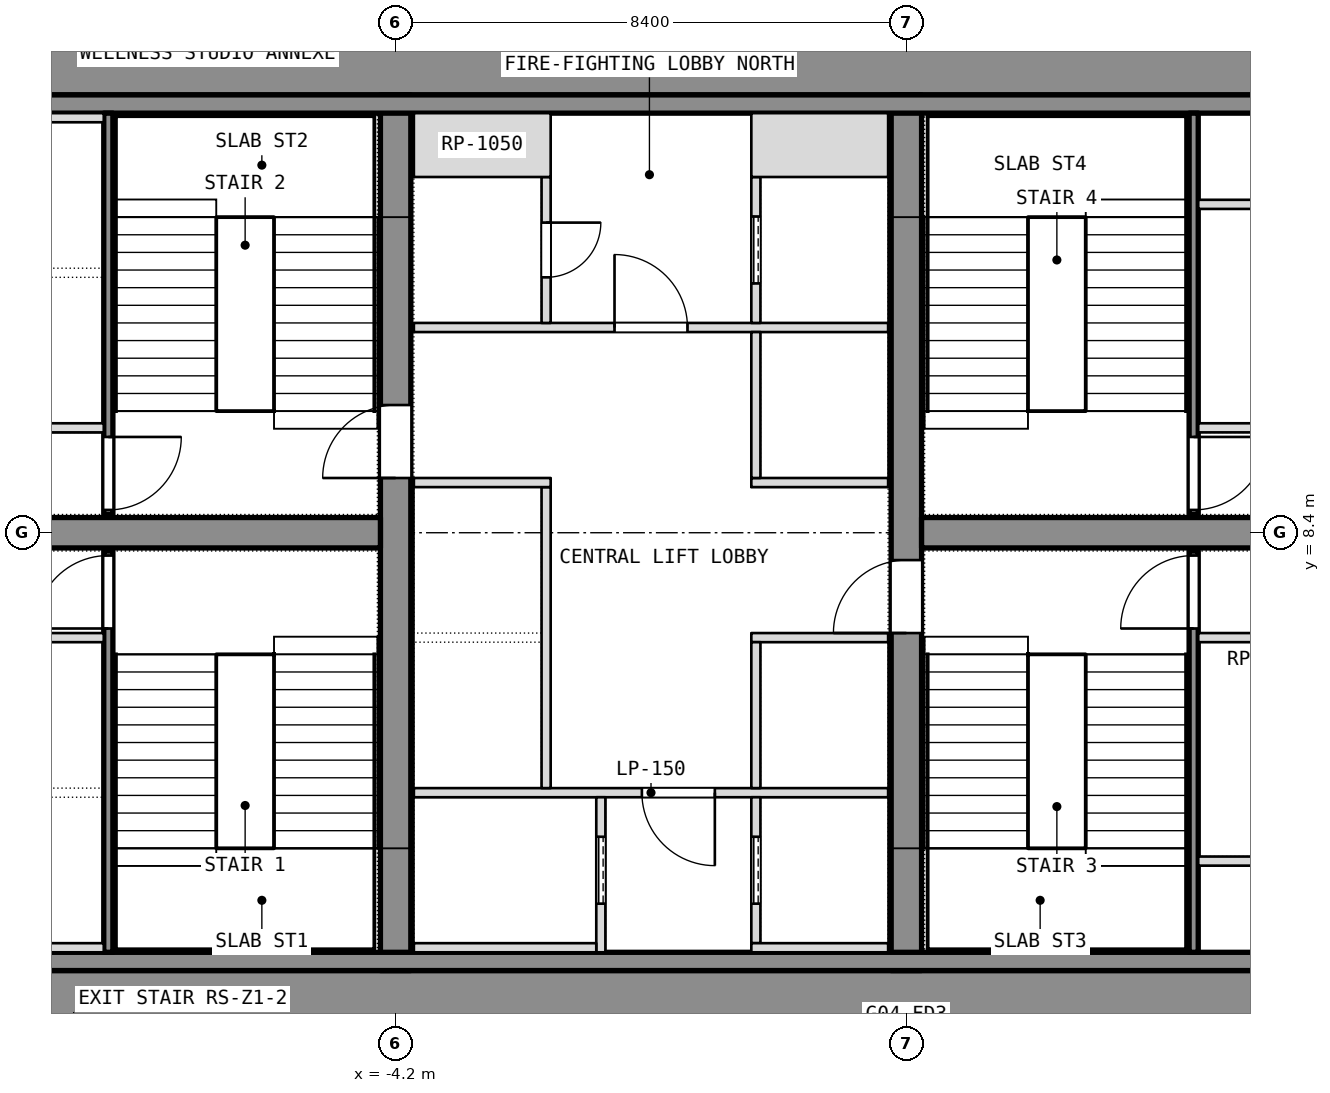
"""IFC4 building model, lengths in metres.
Left out: names, types, materials, properties, quantities, classifications, styles, units other than length and angle.
Written with IfcOpenShell. Run it as: python <this file> out.ifc"""

import sys

from ifc_helpers import new_model, si_unit, direction, frame, frame_2d, origin, place, context, subcontext, project, spatial, rectangle, extrude, element, fill, save


model = new_model("IFC4")
c1 = context("Model", 3, precision=1e-05, world=origin(), true_north=direction((0.0, 1.0)))
c2 = subcontext(c1, "Body", "Model", "MODEL_VIEW")
j1 = project(units=[si_unit("LENGTHUNIT", "METRE"), si_unit("PLANEANGLEUNIT", "RADIAN")], contexts=[c1])
p1 = place(None, origin())
s1 = spatial("IfcSite", under=j1, at=p1, CompositionType="ELEMENT")
p2 = place(p1, origin())
s2 = spatial("IfcBuilding", under=s1, at=p2, CompositionType="ELEMENT")
p3 = place(p2, frame((0.0, 0.0, 58.1)))
s3 = spatial("IfcBuildingStorey", under=s2, at=p3, CompositionType="ELEMENT", Elevation=58.1)
for number, where, z_axis, x_axis in (
    (1, (-11.1, 0.6, 0.0), (0.0, 0.0, 1.0), (1.0, 0.0, 0.0)),
    (2, (-11.1, 16.2, 0.0), (0.0, 0.0, 1.0), (1.0, 0.0, 0.0)),
):
    element("IfcWall", number, at=place(p3, frame(where, z_axis=z_axis, x_axis=x_axis)), inside=s3, PredefinedType="SHEAR", context=c2, shape_type="SweptSolid", body=[
        extrude(rectangle(XDim=22.2, YDim=1.2, at=frame_2d((11.1, 0.0))), origin(), (0.0, 0.0, 1.0), 3.6),
    ])
p4 = place(p3, frame((-4.2, 1.2, 0.0), z_axis=(0.0, 0.0, 1.0), x_axis=(0.0, 1.0, 0.0)))
e3 = element("IfcWall", 3, at=p4, inside=s3, PredefinedType="SHEAR", context=c2, shape_type="SweptSolid", body=[
    extrude(rectangle(XDim=14.4, YDim=0.5, at=frame_2d((7.2, 0.0))), origin(), (0.0, 0.0, 1.0), 3.6),
])
p5 = place(p4, frame((8.1, 0.0, 0.0)))
e4 = element("IfcOpeningElement", 4, at=p5, cuts=e3, PredefinedType="OPENING", context=c2, shape_type="SweptSolid", body=[
    extrude(rectangle(XDim=1.2, YDim=2.1, at=frame_2d((0.6, 1.05))), frame((0.0, 0.25, 0.0), z_axis=(0.0, -1.0, 0.0), x_axis=(1.0, 0.0, 0.0)), (0.0, 0.0, 1.0), 0.5),
])
p6 = place(p3, frame((4.2, 1.2, 0.0), z_axis=(0.0, 0.0, 1.0), x_axis=(0.0, 1.0, 0.0)))
e5 = element("IfcWall", 5, at=p6, inside=s3, PredefinedType="SHEAR", context=c2, shape_type="SweptSolid", body=[
    extrude(rectangle(XDim=14.4, YDim=0.5, at=frame_2d((7.2, 0.0))), origin(), (0.0, 0.0, 1.0), 3.6),
])
p7 = place(p6, frame((5.55, 0.0, 0.0)))
e6 = element("IfcOpeningElement", 6, at=p7, cuts=e5, PredefinedType="OPENING", context=c2, shape_type="SweptSolid", body=[
    extrude(rectangle(XDim=1.2, YDim=2.1, at=frame_2d((0.6, 1.05))), frame((0.0, 0.25, 0.0), z_axis=(0.0, -1.0, 0.0), x_axis=(1.0, 0.0, 0.0)), (0.0, 0.0, 1.0), 0.5),
])
for number, where, z_axis, x_axis in (
    (7, (-11.1, 8.4, 0.0), (0.0, 0.0, 1.0), (1.0, 0.0, 0.0)),
    (8, (4.45, 8.4, 0.0), (0.0, 0.0, 1.0), (1.0, 0.0, 0.0)),
):
    element("IfcWall", number, at=place(p3, frame(where, z_axis=z_axis, x_axis=x_axis)), inside=s3, PredefinedType="SHEAR", context=c2, shape_type="SweptSolid", body=[
        extrude(rectangle(XDim=6.65, YDim=0.5, at=frame_2d((3.325, 0.0))), origin(), (0.0, 0.0, 1.0), 3.6),
    ])
for number, where, z_axis, x_axis in (
    (9, (-11.1, 1.35, 0.0), (0.0, 0.0, 1.0), (1.0, 0.0, 0.0)),
    (10, (-11.1, 15.45, 0.0), (0.0, 0.0, 1.0), (1.0, 0.0, 0.0)),
):
    element("IfcWall", number, at=place(p3, frame(where, z_axis=z_axis, x_axis=x_axis)), inside=s3, PredefinedType="PARTITIONING", context=c2, shape_type="SweptSolid", body=[
        extrude(rectangle(XDim=22.2, YDim=0.3, at=frame_2d((11.1, 0.0))), origin(), (0.0, 0.0, 1.0), 3.34),
    ])
p8 = place(p3, frame((-8.925, 1.5, 0.0), z_axis=(0.0, 0.0, 1.0), x_axis=(0.0, 1.0, 0.0)))
e11 = element("IfcWall", 11, at=p8, inside=s3, PredefinedType="SHEAR", context=c2, shape_type="SweptSolid", body=[
    extrude(rectangle(XDim=6.6, YDim=0.15, at=frame_2d((3.3, 0.0))), origin(), (0.0, 0.0, 1.0), 3.34),
])
p9 = place(p8, frame((5.325, 0.0, 0.0)))
e12 = element("IfcOpeningElement", 12, at=p9, cuts=e11, PredefinedType="OPENING", context=c2, shape_type="SweptSolid", body=[
    extrude(rectangle(XDim=1.2, YDim=2.1, at=frame_2d((0.6, 1.05))), frame((0.0, 0.075, 0.0), z_axis=(0.0, -1.0, 0.0), x_axis=(1.0, 0.0, 0.0)), (0.0, 0.0, 1.0), 0.15),
])
for number, where, z_axis, x_axis in (
    (13, (-11.1, 6.675, 0.0), (0.0, 0.0, 1.0), (1.0, 0.0, 0.0)),
    (14, (-11.1, 1.575, 0.0), (0.0, 0.0, 1.0), (1.0, 0.0, 0.0)),
):
    element("IfcWall", number, at=place(p3, frame(where, z_axis=z_axis, x_axis=x_axis)), inside=s3, PredefinedType="SHEAR", context=c2, shape_type="SweptSolid", body=[
        extrude(rectangle(XDim=2.1, YDim=0.15, at=frame_2d((1.05, 0.0))), origin(), (0.0, 0.0, 1.0), 3.6),
    ])
p10 = place(p3, frame((-8.925, 8.7, 0.0), z_axis=(0.0, 0.0, 1.0), x_axis=(0.0, 1.0, 0.0)))
e15 = element("IfcWall", 15, at=p10, inside=s3, PredefinedType="SHEAR", context=c2, shape_type="SweptSolid", body=[
    extrude(rectangle(XDim=6.6, YDim=0.15, at=frame_2d((3.3, 0.0))), origin(), (0.0, 0.0, 1.0), 3.34),
])
p11 = place(p10, frame((0.075, 0.0, 0.0)))
e16 = element("IfcOpeningElement", 16, at=p11, cuts=e15, PredefinedType="OPENING", context=c2, shape_type="SweptSolid", body=[
    extrude(rectangle(XDim=1.2, YDim=2.1, at=frame_2d((0.6, 1.05))), frame((0.0, 0.075, 0.0), z_axis=(0.0, -1.0, 0.0), x_axis=(1.0, 0.0, 0.0)), (0.0, 0.0, 1.0), 0.15),
])
for number, where, z_axis, x_axis in (
    (17, (-11.1, 10.125, 0.0), (0.0, 0.0, 1.0), (1.0, 0.0, 0.0)),
    (18, (-11.1, 15.225, 0.0), (0.0, 0.0, 1.0), (1.0, 0.0, 0.0)),
):
    element("IfcWall", number, at=place(p3, frame(where, z_axis=z_axis, x_axis=x_axis)), inside=s3, PredefinedType="SHEAR", context=c2, shape_type="SweptSolid", body=[
        extrude(rectangle(XDim=2.1, YDim=0.15, at=frame_2d((1.05, 0.0))), origin(), (0.0, 0.0, 1.0), 3.6),
    ])
p12 = place(p3, frame((8.925, 1.5, 0.0), z_axis=(0.0, 0.0, 1.0), x_axis=(0.0, 1.0, 0.0)))
e19 = element("IfcWall", 19, at=p12, inside=s3, PredefinedType="SHEAR", context=c2, shape_type="SweptSolid", body=[
    extrude(rectangle(XDim=6.6, YDim=0.15, at=frame_2d((3.3, 0.0))), origin(), (0.0, 0.0, 1.0), 3.34),
])
p13 = place(p12, frame((5.325, 0.0, 0.0)))
e20 = element("IfcOpeningElement", 20, at=p13, cuts=e19, PredefinedType="OPENING", context=c2, shape_type="SweptSolid", body=[
    extrude(rectangle(XDim=1.2, YDim=2.1, at=frame_2d((0.6, 1.05))), frame((0.0, 0.075, 0.0), z_axis=(0.0, -1.0, 0.0), x_axis=(1.0, 0.0, 0.0)), (0.0, 0.0, 1.0), 0.15),
])
for number, where, z_axis, x_axis in (
    (21, (9.0, 6.675, 0.0), (0.0, 0.0, 1.0), (1.0, 0.0, 0.0)),
    (22, (9.0, 3.0, 0.0), (0.0, 0.0, 1.0), (1.0, 0.0, 0.0)),
):
    element("IfcWall", number, at=place(p3, frame(where, z_axis=z_axis, x_axis=x_axis)), inside=s3, PredefinedType="PARTITIONING", context=c2, shape_type="SweptSolid", body=[
        extrude(rectangle(XDim=2.1, YDim=0.15, at=frame_2d((1.05, 0.0))), origin(), (0.0, 0.0, 1.0), 3.34),
    ])
p14 = place(p3, frame((8.925, 8.7, 0.0), z_axis=(0.0, 0.0, 1.0), x_axis=(0.0, 1.0, 0.0)))
e23 = element("IfcWall", 23, at=p14, inside=s3, PredefinedType="SHEAR", context=c2, shape_type="SweptSolid", body=[
    extrude(rectangle(XDim=6.6, YDim=0.15, at=frame_2d((3.3, 0.0))), origin(), (0.0, 0.0, 1.0), 3.34),
])
p15 = place(p14, frame((0.075, 0.0, 0.0)))
e24 = element("IfcOpeningElement", 24, at=p15, cuts=e23, PredefinedType="OPENING", context=c2, shape_type="SweptSolid", body=[
    extrude(rectangle(XDim=1.2, YDim=2.1, at=frame_2d((0.6, 1.05))), frame((0.0, 0.075, 0.0), z_axis=(0.0, -1.0, 0.0), x_axis=(1.0, 0.0, 0.0)), (0.0, 0.0, 1.0), 0.15),
])
for number, where, z_axis, x_axis in (
    (25, (9.0, 10.125, 0.0), (0.0, 0.0, 1.0), (1.0, 0.0, 0.0)),
    (26, (9.0, 13.8, 0.0), (0.0, 0.0, 1.0), (1.0, 0.0, 0.0)),
):
    element("IfcWall", number, at=place(p3, frame(where, z_axis=z_axis, x_axis=x_axis)), inside=s3, PredefinedType="PARTITIONING", context=c2, shape_type="SweptSolid", body=[
        extrude(rectangle(XDim=2.1, YDim=0.15, at=frame_2d((1.05, 0.0))), origin(), (0.0, 0.0, 1.0), 3.34),
    ])
p16 = place(p3, frame((-3.9, 4.125, 0.0), z_axis=(0.0, 0.0, 1.0), x_axis=(1.0, 0.0, 0.0)))
e27 = element("IfcWall", 27, at=p16, inside=s3, PredefinedType="PARTITIONING", context=c2, shape_type="SweptSolid", body=[
    extrude(rectangle(XDim=7.8, YDim=0.15, at=frame_2d((3.9, 0.0))), origin(), (0.0, 0.0, 1.0), 3.34),
])
p17 = place(p16, frame((3.75, 0.0, 0.0)))
e28 = element("IfcOpeningElement", 28, at=p17, cuts=e27, PredefinedType="OPENING", context=c2, shape_type="SweptSolid", body=[
    extrude(rectangle(XDim=1.2, YDim=2.1, at=frame_2d((0.6, 1.05))), frame((0.0, 0.075, 0.0), z_axis=(0.0, -1.0, 0.0), x_axis=(1.0, 0.0, 0.0)), (0.0, 0.0, 1.0), 0.15),
])
p18 = place(p3, frame((-3.9, 11.775, 0.0), z_axis=(0.0, 0.0, 1.0), x_axis=(1.0, 0.0, 0.0)))
e29 = element("IfcWall", 29, at=p18, inside=s3, PredefinedType="PARTITIONING", context=c2, shape_type="SweptSolid", body=[
    extrude(rectangle(XDim=7.8, YDim=0.15, at=frame_2d((3.9, 0.0))), origin(), (0.0, 0.0, 1.0), 3.34),
])
p19 = place(p18, frame((3.3, 0.0, 0.0)))
e30 = element("IfcOpeningElement", 30, at=p19, cuts=e29, PredefinedType="OPENING", context=c2, shape_type="SweptSolid", body=[
    extrude(rectangle(XDim=1.2, YDim=2.1, at=frame_2d((0.6, 1.05))), frame((0.0, 0.075, 0.0), z_axis=(0.0, -1.0, 0.0), x_axis=(1.0, 0.0, 0.0)), (0.0, 0.0, 1.0), 0.15),
])
p20 = place(p3, frame((-0.825, 1.5, 0.0), z_axis=(0.0, 0.0, 1.0), x_axis=(0.0, 1.0, 0.0)))
e31 = element("IfcWall", 31, at=p20, inside=s3, PredefinedType="SHEAR", context=c2, shape_type="SweptSolid", body=[
    extrude(rectangle(XDim=2.55, YDim=0.15, at=frame_2d((1.275, 0.0))), origin(), (0.0, 0.0, 1.0), 3.6),
])
p21 = place(p20, frame((0.8, 0.0, 0.0)))
e32 = element("IfcOpeningElement", 32, at=p21, cuts=e31, PredefinedType="OPENING", context=c2, shape_type="SweptSolid", body=[
    extrude(rectangle(XDim=1.1, YDim=2.1, at=frame_2d((0.55, 1.05))), frame((0.0, 0.075, 0.0), z_axis=(0.0, -1.0, 0.0), x_axis=(1.0, 0.0, 0.0)), (0.0, 0.0, 1.0), 0.15),
])
p22 = place(p3, frame((-3.9, 1.575, 0.0), z_axis=(0.0, 0.0, 1.0), x_axis=(1.0, 0.0, 0.0)))
e33 = element("IfcWall", 33, at=p22, inside=s3, PredefinedType="SHEAR", context=c2, shape_type="SweptSolid", body=[
    extrude(rectangle(XDim=3.0, YDim=0.15, at=frame_2d((1.5, 0.0))), origin(), (0.0, 0.0, 1.0), 3.6),
])
p23 = place(p3, frame((-1.725, 4.2, 0.0), z_axis=(0.0, 0.0, 1.0), x_axis=(0.0, 1.0, 0.0)))
e34 = element("IfcWall", 34, at=p23, inside=s3, PredefinedType="SHEAR", context=c2, shape_type="SweptSolid", body=[
    extrude(rectangle(XDim=4.95, YDim=0.15, at=frame_2d((2.475, 0.0))), origin(), (0.0, 0.0, 1.0), 3.6),
])
p24 = place(p3, frame((-3.9, 9.225, 0.0), z_axis=(0.0, 0.0, 1.0), x_axis=(1.0, 0.0, 0.0)))
e35 = element("IfcWall", 35, at=p24, inside=s3, PredefinedType="SHEAR", context=c2, shape_type="SweptSolid", body=[
    extrude(rectangle(XDim=2.25, YDim=0.15, at=frame_2d((1.125, 0.0))), origin(), (0.0, 0.0, 1.0), 3.6),
])
p25 = place(p3, frame((-1.725, 11.85, 0.0), z_axis=(0.0, 0.0, 1.0), x_axis=(0.0, 1.0, 0.0)))
e36 = element("IfcWall", 36, at=p25, inside=s3, PredefinedType="PARTITIONING", context=c2, shape_type="SweptSolid", body=[
    extrude(rectangle(XDim=2.4, YDim=0.15, at=frame_2d((1.2, 0.0))), origin(), (0.0, 0.0, 1.0), 3.34),
])
p26 = place(p25, frame((0.75, 0.0, 0.0)))
e37 = element("IfcOpeningElement", 37, at=p26, cuts=e36, PredefinedType="OPENING", context=c2, shape_type="SweptSolid", body=[
    extrude(rectangle(XDim=0.9, YDim=2.1, at=frame_2d((0.45, 1.05))), frame((0.0, 0.075, 0.0), z_axis=(0.0, -1.0, 0.0), x_axis=(1.0, 0.0, 0.0)), (0.0, 0.0, 1.0), 0.15),
])
p27 = place(p3, frame((-3.9, 14.775, 0.0), z_axis=(0.0, 0.0, 1.0), x_axis=(1.0, 0.0, 0.0)))
e38 = element("IfcWall", 38, at=p27, inside=s3, PredefinedType="PARTITIONING", context=c2, shape_type="SweptSolid", body=[
    extrude(rectangle(XDim=2.25, YDim=1.05, at=frame_2d((1.125, 0.0))), origin(), (0.0, 0.0, 1.0), 3.34),
])
p28 = place(p3, frame((1.725, 1.65, 0.0), z_axis=(0.0, 0.0, 1.0), x_axis=(0.0, 1.0, 0.0)))
e39 = element("IfcWall", 39, at=p28, inside=s3, PredefinedType="SHEAR", context=c2, shape_type="SweptSolid", body=[
    extrude(rectangle(XDim=2.4, YDim=0.15, at=frame_2d((1.2, 0.0))), origin(), (0.0, 0.0, 1.0), 3.6),
])
p29 = place(p28, frame((0.65, 0.0, 0.0)))
e40 = element("IfcOpeningElement", 40, at=p29, cuts=e39, PredefinedType="OPENING", context=c2, shape_type="SweptSolid", body=[
    extrude(rectangle(XDim=1.1, YDim=2.1, at=frame_2d((0.55, 1.05))), frame((0.0, 0.075, 0.0), z_axis=(0.0, -1.0, 0.0), x_axis=(1.0, 0.0, 0.0)), (0.0, 0.0, 1.0), 0.15),
])
p30 = place(p3, frame((1.65, 1.575, 0.0), z_axis=(0.0, 0.0, 1.0), x_axis=(1.0, 0.0, 0.0)))
e41 = element("IfcWall", 41, at=p30, inside=s3, PredefinedType="SHEAR", context=c2, shape_type="SweptSolid", body=[
    extrude(rectangle(XDim=2.25, YDim=0.15, at=frame_2d((1.125, 0.0))), origin(), (0.0, 0.0, 1.0), 3.6),
])
p31 = place(p3, frame((1.725, 11.85, 0.0), z_axis=(0.0, 0.0, 1.0), x_axis=(0.0, 1.0, 0.0)))
e42 = element("IfcWall", 42, at=p31, inside=s3, PredefinedType="SHEAR", context=c2, shape_type="SweptSolid", body=[
    extrude(rectangle(XDim=2.4, YDim=0.15, at=frame_2d((1.2, 0.0))), origin(), (0.0, 0.0, 1.0), 3.6),
])
p32 = place(p31, frame((0.65, 0.0, 0.0)))
e43 = element("IfcOpeningElement", 43, at=p32, cuts=e42, PredefinedType="OPENING", context=c2, shape_type="SweptSolid", body=[
    extrude(rectangle(XDim=1.1, YDim=2.1, at=frame_2d((0.55, 1.05))), frame((0.0, 0.075, 0.0), z_axis=(0.0, -1.0, 0.0), x_axis=(1.0, 0.0, 0.0)), (0.0, 0.0, 1.0), 0.15),
])
p33 = place(p3, frame((1.65, 14.775, 0.0), z_axis=(0.0, 0.0, 1.0), x_axis=(1.0, 0.0, 0.0)))
e44 = element("IfcWall", 44, at=p33, inside=s3, PredefinedType="SHEAR", context=c2, shape_type="SweptSolid", body=[
    extrude(rectangle(XDim=2.25, YDim=1.05, at=frame_2d((1.125, 0.0))), origin(), (0.0, 0.0, 1.0), 3.6),
])
for number, where, z_axis, x_axis in (
    (45, (1.65, 6.675, 0.0), (0.0, 0.0, 1.0), (1.0, 0.0, 0.0)),
    (46, (1.65, 9.225, 0.0), (0.0, 0.0, 1.0), (1.0, 0.0, 0.0)),
):
    element("IfcWall", number, at=place(p3, frame(where, z_axis=z_axis, x_axis=x_axis)), inside=s3, PredefinedType="SHEAR", context=c2, shape_type="SweptSolid", body=[
        extrude(rectangle(XDim=2.25, YDim=0.15, at=frame_2d((1.125, 0.0))), origin(), (0.0, 0.0, 1.0), 3.6),
    ])
p34 = place(p3, frame((1.725, 4.2, 0.0), z_axis=(0.0, 0.0, 1.0), x_axis=(0.0, 1.0, 0.0)))
e47 = element("IfcWall", 47, at=p34, inside=s3, PredefinedType="SHEAR", context=c2, shape_type="SweptSolid", body=[
    extrude(rectangle(XDim=2.4, YDim=0.15, at=frame_2d((1.2, 0.0))), origin(), (0.0, 0.0, 1.0), 3.6),
])
p35 = place(p3, frame((1.725, 9.3, 0.0), z_axis=(0.0, 0.0, 1.0), x_axis=(0.0, 1.0, 0.0)))
e48 = element("IfcWall", 48, at=p35, inside=s3, PredefinedType="SHEAR", context=c2, shape_type="SweptSolid", body=[
    extrude(rectangle(XDim=2.4, YDim=0.15, at=frame_2d((1.2, 0.0))), origin(), (0.0, 0.0, 1.0), 3.6),
])
p36 = place(p9, origin())
e49 = element("IfcDoor", 49, at=p36, inside=s3, OperationType="SINGLE_SWING_LEFT", PredefinedType="DOOR", context=c2, shape_type="SweptSolid", body=[
    extrude(rectangle(XDim=1.2, YDim=2.1, at=frame_2d((0.6, 1.05))), frame((0.0, 0.025, 0.0), z_axis=(0.0, -1.0, 0.0), x_axis=(1.0, 0.0, 0.0)), (0.0, 0.0, 1.0), 0.05),
])
fill(e12, e49)
p37 = place(p11, origin())
e50 = element("IfcDoor", 50, at=p37, inside=s3, OperationType="SINGLE_SWING_LEFT", PredefinedType="DOOR", context=c2, shape_type="SweptSolid", body=[
    extrude(rectangle(XDim=1.2, YDim=2.1, at=frame_2d((0.6, 1.05))), frame((0.0, 0.025, 0.0), z_axis=(0.0, -1.0, 0.0), x_axis=(1.0, 0.0, 0.0)), (0.0, 0.0, 1.0), 0.05),
])
fill(e16, e50)
p38 = place(p13, origin())
e51 = element("IfcDoor", 51, at=p38, inside=s3, OperationType="SINGLE_SWING_LEFT", PredefinedType="DOOR", context=c2, shape_type="SweptSolid", body=[
    extrude(rectangle(XDim=1.2, YDim=2.1, at=frame_2d((0.6, 1.05))), frame((0.0, 0.025, 0.0), z_axis=(0.0, -1.0, 0.0), x_axis=(1.0, 0.0, 0.0)), (0.0, 0.0, 1.0), 0.05),
])
fill(e20, e51)
p39 = place(p15, origin())
e52 = element("IfcDoor", 52, at=p39, inside=s3, OperationType="SINGLE_SWING_LEFT", PredefinedType="DOOR", context=c2, shape_type="SweptSolid", body=[
    extrude(rectangle(XDim=1.2, YDim=2.1, at=frame_2d((0.6, 1.05))), frame((0.0, 0.025, 0.0), z_axis=(0.0, -1.0, 0.0), x_axis=(1.0, 0.0, 0.0)), (0.0, 0.0, 1.0), 0.05),
])
fill(e24, e52)
p40 = place(p21, origin())
e53 = element("IfcDoor", 53, at=p40, inside=s3, OperationType="SLIDING_TO_LEFT", PredefinedType="DOOR", context=c2, shape_type="SweptSolid", body=[
    extrude(rectangle(XDim=1.1, YDim=2.1, at=frame_2d((0.55, 1.05))), frame((0.0, 0.025, 0.0), z_axis=(0.0, -1.0, 0.0), x_axis=(1.0, 0.0, 0.0)), (0.0, 0.0, 1.0), 0.05),
])
fill(e32, e53)
p41 = place(p29, origin())
e54 = element("IfcDoor", 54, at=p41, inside=s3, OperationType="SLIDING_TO_LEFT", PredefinedType="DOOR", context=c2, shape_type="SweptSolid", body=[
    extrude(rectangle(XDim=1.1, YDim=2.1, at=frame_2d((0.55, 1.05))), frame((0.0, 0.025, 0.0), z_axis=(0.0, -1.0, 0.0), x_axis=(1.0, 0.0, 0.0)), (0.0, 0.0, 1.0), 0.05),
])
fill(e40, e54)
p42 = place(p32, origin())
e55 = element("IfcDoor", 55, at=p42, inside=s3, OperationType="SLIDING_TO_LEFT", PredefinedType="DOOR", context=c2, shape_type="SweptSolid", body=[
    extrude(rectangle(XDim=1.1, YDim=2.1, at=frame_2d((0.55, 1.05))), frame((0.0, 0.025, 0.0), z_axis=(0.0, -1.0, 0.0), x_axis=(1.0, 0.0, 0.0)), (0.0, 0.0, 1.0), 0.05),
])
fill(e43, e55)
p43 = place(p17, origin())
e56 = element("IfcDoor", 56, at=p43, inside=s3, OperationType="SINGLE_SWING_LEFT", PredefinedType="DOOR", context=c2, shape_type="SweptSolid", body=[
    extrude(rectangle(XDim=1.2, YDim=2.1, at=frame_2d((0.6, 1.05))), frame((0.0, 0.025, 0.0), z_axis=(0.0, -1.0, 0.0), x_axis=(1.0, 0.0, 0.0)), (0.0, 0.0, 1.0), 0.05),
])
fill(e28, e56)
p44 = place(p19, origin())
e57 = element("IfcDoor", 57, at=p44, inside=s3, OperationType="SINGLE_SWING_LEFT", PredefinedType="DOOR", context=c2, shape_type="SweptSolid", body=[
    extrude(rectangle(XDim=1.2, YDim=2.1, at=frame_2d((0.6, 1.05))), frame((0.0, 0.025, 0.0), z_axis=(0.0, -1.0, 0.0), x_axis=(1.0, 0.0, 0.0)), (0.0, 0.0, 1.0), 0.05),
])
fill(e30, e57)
p45 = place(p26, origin())
e58 = element("IfcDoor", 58, at=p45, inside=s3, OperationType="SINGLE_SWING_LEFT", PredefinedType="DOOR", context=c2, shape_type="SweptSolid", body=[
    extrude(rectangle(XDim=0.9, YDim=2.1, at=frame_2d((0.45, 1.05))), frame((0.0, 0.025, 0.0), z_axis=(0.0, -1.0, 0.0), x_axis=(1.0, 0.0, 0.0)), (0.0, 0.0, 1.0), 0.05),
])
fill(e37, e58)
p46 = place(p5, origin())
e59 = element("IfcDoor", 59, at=p46, inside=s3, OperationType="SINGLE_SWING_LEFT", PredefinedType="DOOR", context=c2, shape_type="SweptSolid", body=[
    extrude(rectangle(XDim=1.2, YDim=2.1, at=frame_2d((0.6, 1.05))), frame((0.0, 0.025, 0.0), z_axis=(0.0, -1.0, 0.0), x_axis=(1.0, 0.0, 0.0)), (0.0, 0.0, 1.0), 0.05),
])
fill(e4, e59)
p47 = place(p7, origin())
e60 = element("IfcDoor", 60, at=p47, inside=s3, OperationType="SINGLE_SWING_LEFT", PredefinedType="DOOR", context=c2, shape_type="SweptSolid", body=[
    extrude(rectangle(XDim=1.2, YDim=2.1, at=frame_2d((0.6, 1.05))), frame((0.0, 0.025, 0.0), z_axis=(0.0, -1.0, 0.0), x_axis=(1.0, 0.0, 0.0)), (0.0, 0.0, 1.0), 0.05),
])
fill(e6, e60)
save(model, sys.argv[1])
